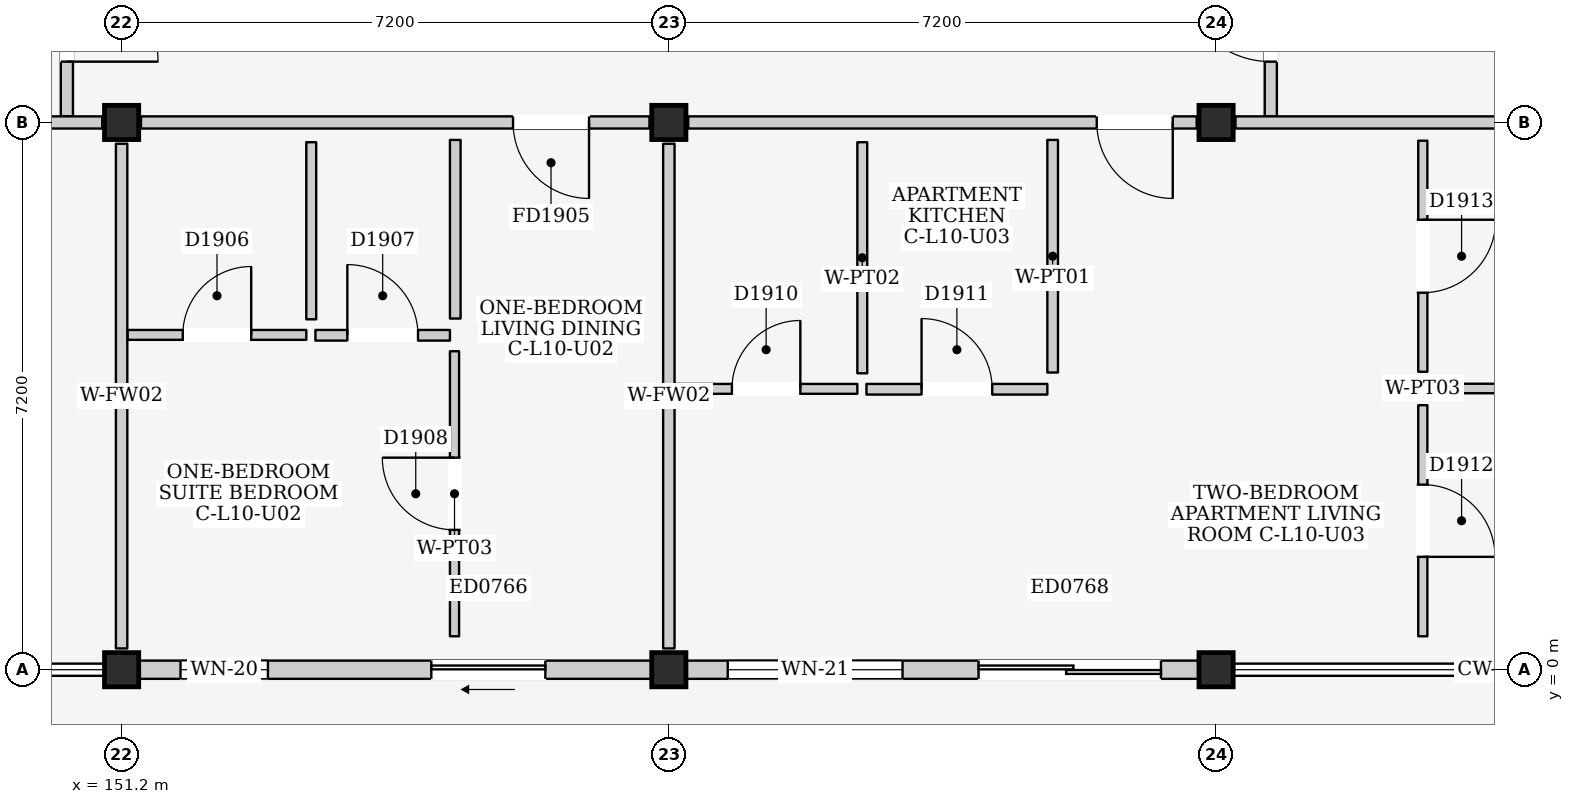
"""IFC4 building model, lengths in metres.
Left out: names, types, materials, properties, quantities, classifications, styles, units other than length and angle.
Written with IfcOpenShell. Run it as: python <this file> out.ifc"""

import sys

from ifc_helpers import new_model, si_unit, direction, frame, frame_2d, origin, origin_2d, place, context, subcontext, project, spatial, rectangle, extrude, element, fill, save


model = new_model("IFC4")
c1 = context("Model", 3, precision=1e-05, world=origin(), true_north=direction((0.0, 1.0)))
c2 = subcontext(c1, "Body", "Model", "MODEL_VIEW")
j1 = project(units=[si_unit("LENGTHUNIT", "METRE"), si_unit("PLANEANGLEUNIT", "RADIAN")], contexts=[c1])
p1 = place(None, origin())
s1 = spatial("IfcSite", under=j1, at=p1, CompositionType="ELEMENT")
p2 = place(p1, origin())
s2 = spatial("IfcBuilding", under=s1, at=p2, CompositionType="ELEMENT")
p3 = place(p2, frame((0.0, 0.0, 34.8)))
s3 = spatial("IfcBuildingStorey", under=s2, at=p3, CompositionType="ELEMENT", Elevation=34.8)
for number, where, z_axis, x_axis in (
    (1, (151.2, 0.0, 0.0), (0.0, 0.0, 1.0), (1.0, 0.0, 0.0)),
    (2, (151.2, 7.2, 0.0), (0.0, 0.0, 1.0), (1.0, 0.0, 0.0)),
    (3, (158.4, 0.0, 0.0), (0.0, 0.0, 1.0), (1.0, 0.0, 0.0)),
    (4, (158.4, 7.2, 0.0), (0.0, 0.0, 1.0), (1.0, 0.0, 0.0)),
    (5, (165.6, 0.0, 0.0), (0.0, 0.0, 1.0), (1.0, 0.0, 0.0)),
    (6, (165.6, 7.2, 0.0), (0.0, 0.0, 1.0), (1.0, 0.0, 0.0)),
):
    element("IfcColumn", number, at=place(p3, frame(where, z_axis=z_axis, x_axis=x_axis)), inside=s3, PredefinedType="COLUMN", context=c2, shape_type="SweptSolid", body=[
        extrude(rectangle(XDim=0.45, YDim=0.45, at=origin_2d()), origin(), (0.0, 0.0, 1.0), 3.2),
    ])
p4 = place(p3, frame((151.425, 0.0, 0.0), z_axis=(0.0, 0.0, 1.0), x_axis=(1.0, 0.0, 0.0)))
e7 = element("IfcWall", 7, at=p4, inside=s3, PredefinedType="ELEMENTEDWALL", context=c2, shape_type="SweptSolid", body=[
    extrude(rectangle(XDim=6.75, YDim=0.24, at=frame_2d((3.375, 0.0))), origin(), (0.0, 0.0, 1.0), 2.495),
])
p5 = place(p4, frame((3.85, 0.0, 0.0)))
e8 = element("IfcOpeningElement", 8, at=p5, cuts=e7, PredefinedType="OPENING", context=c2, shape_type="SweptSolid", body=[
    extrude(rectangle(XDim=1.5, YDim=2.12, at=frame_2d((0.75, 1.06))), frame((0.0, 0.135, 0.0), z_axis=(0.0, -1.0, 0.0), x_axis=(1.0, 0.0, 0.0)), (0.0, 0.0, 1.0), 0.27),
])
p6 = place(p4, frame((0.55, 0.0, 0.9)))
e9 = element("IfcOpeningElement", 9, at=p6, cuts=e7, PredefinedType="OPENING", context=c2, shape_type="SweptSolid", body=[
    extrude(rectangle(XDim=1.15, YDim=1.15, at=frame_2d((0.575, 0.575))), frame((0.0, 0.135, 0.0), z_axis=(0.0, -1.0, 0.0), x_axis=(1.0, 0.0, 0.0)), (0.0, 0.0, 1.0), 0.27),
])
p7 = place(p3, frame((158.625, 0.0, 0.0), z_axis=(0.0, 0.0, 1.0), x_axis=(1.0, 0.0, 0.0)))
e10 = element("IfcWall", 10, at=p7, inside=s3, PredefinedType="ELEMENTEDWALL", context=c2, shape_type="SweptSolid", body=[
    extrude(rectangle(XDim=6.75, YDim=0.24, at=frame_2d((3.375, 0.0))), origin(), (0.0, 0.0, 1.0), 2.495),
])
p8 = place(p7, frame((3.85, 0.0, 0.0)))
e11 = element("IfcOpeningElement", 11, at=p8, cuts=e10, PredefinedType="OPENING", context=c2, shape_type="SweptSolid", body=[
    extrude(rectangle(XDim=2.4, YDim=2.12, at=frame_2d((1.2, 1.06))), frame((0.0, 0.135, 0.0), z_axis=(0.0, -1.0, 0.0), x_axis=(1.0, 0.0, 0.0)), (0.0, 0.0, 1.0), 0.27),
])
p9 = place(p7, frame((0.55, 0.0, 0.785)))
e12 = element("IfcOpeningElement", 12, at=p9, cuts=e10, PredefinedType="OPENING", context=c2, shape_type="SweptSolid", body=[
    extrude(rectangle(XDim=2.3, YDim=1.6, at=frame_2d((1.15, 0.8))), frame((0.0, 0.135, 0.0), z_axis=(0.0, -1.0, 0.0), x_axis=(1.0, 0.0, 0.0)), (0.0, 0.0, 1.0), 0.27),
])
p10 = place(p3, frame((150.48, 7.28, 0.0), z_axis=(0.0, 0.0, 1.0), x_axis=(0.0, 1.0, 0.0)))
e13 = element("IfcWall", 13, at=p10, inside=s3, PredefinedType="PARTITIONING", context=c2, shape_type="SweptSolid", body=[
    extrude(rectangle(XDim=4.32, YDim=0.16, at=frame_2d((2.16, 0.0))), origin(), (0.0, 0.0, 1.0), 2.96),
])
p11 = place(p10, frame((0.72, 0.0, 0.0)))
e14 = element("IfcOpeningElement", 14, at=p11, cuts=e13, PredefinedType="OPENING", context=c2, shape_type="SweptSolid", body=[
    extrude(rectangle(XDim=1.2, YDim=2.2, at=frame_2d((0.6, 1.1))), frame((0.0, 0.095, 0.0), z_axis=(0.0, -1.0, 0.0), x_axis=(1.0, 0.0, 0.0)), (0.0, 0.0, 1.0), 0.19),
])
p12 = place(p3, frame((166.32, 7.28, 0.0), z_axis=(0.0, 0.0, 1.0), x_axis=(0.0, 1.0, 0.0)))
e15 = element("IfcWall", 15, at=p12, inside=s3, PredefinedType="PARTITIONING", context=c2, shape_type="SweptSolid", body=[
    extrude(rectangle(XDim=4.32, YDim=0.16, at=frame_2d((2.16, 0.0))), origin(), (0.0, 0.0, 1.0), 2.96),
])
p13 = place(p12, frame((0.72, 0.0, 0.0)))
e16 = element("IfcOpeningElement", 16, at=p13, cuts=e15, PredefinedType="OPENING", context=c2, shape_type="SweptSolid", body=[
    extrude(rectangle(XDim=1.2, YDim=2.2, at=frame_2d((0.6, 1.1))), frame((0.0, 0.095, 0.0), z_axis=(0.0, -1.0, 0.0), x_axis=(1.0, 0.0, 0.0)), (0.0, 0.0, 1.0), 0.19),
])
p14 = place(p3, frame((144.255, 7.2, 0.0), z_axis=(0.0, 0.0, 1.0), x_axis=(1.0, 0.0, 0.0)))
e17 = element("IfcWall", 17, at=p14, inside=s3, PredefinedType="PARTITIONING", context=c2, shape_type="SweptSolid", body=[
    extrude(rectangle(XDim=6.69, YDim=0.16, at=frame_2d((3.345, 0.0))), origin(), (0.0, 0.0, 1.0), 2.345),
])
p15 = place(p3, frame((151.2, 0.28, 0.0), z_axis=(0.0, 0.0, 1.0), x_axis=(0.0, 1.0, 0.0)))
e18 = element("IfcWall", 18, at=p15, inside=s3, PredefinedType="PARTITIONING", context=c2, shape_type="SweptSolid", body=[
    extrude(rectangle(XDim=6.64, YDim=0.15, at=frame_2d((3.32, 0.0))), origin(), (0.0, 0.0, 1.0), 2.445),
])
p16 = place(p3, frame((151.455, 7.2, 0.0), z_axis=(0.0, 0.0, 1.0), x_axis=(1.0, 0.0, 0.0)))
e19 = element("IfcWall", 19, at=p16, inside=s3, PredefinedType="PARTITIONING", context=c2, shape_type="SweptSolid", body=[
    extrude(rectangle(XDim=6.69, YDim=0.16, at=frame_2d((3.345, 0.0))), origin(), (0.0, 0.0, 1.0), 2.345),
])
p17 = place(p16, frame((4.895, 0.0, 0.0)))
e20 = element("IfcOpeningElement", 20, at=p17, cuts=e19, PredefinedType="OPENING", context=c2, shape_type="SweptSolid", body=[
    extrude(rectangle(XDim=1.0, YDim=2.15, at=frame_2d((0.5, 1.075))), frame((0.0, 0.095, 0.0), z_axis=(0.0, -1.0, 0.0), x_axis=(1.0, 0.0, 0.0)), (0.0, 0.0, 1.0), 0.19),
])
p18 = place(p3, frame((158.4, 0.28, 0.0), z_axis=(0.0, 0.0, 1.0), x_axis=(0.0, 1.0, 0.0)))
e21 = element("IfcWall", 21, at=p18, inside=s3, PredefinedType="PARTITIONING", context=c2, shape_type="SweptSolid", body=[
    extrude(rectangle(XDim=6.64, YDim=0.15, at=frame_2d((3.32, 0.0))), origin(), (0.0, 0.0, 1.0), 2.445),
])
p19 = place(p3, frame((151.28, 4.405, 0.0), z_axis=(0.0, 0.0, 1.0), x_axis=(1.0, 0.0, 0.0)))
e22 = element("IfcWall", 22, at=p19, inside=s3, PredefinedType="PARTITIONING", context=c2, shape_type="SweptSolid", body=[
    extrude(rectangle(XDim=2.35, YDim=0.13, at=frame_2d((1.175, 0.0))), origin(), (0.0, 0.0, 1.0), 2.96),
])
p20 = place(p19, frame((0.725, 0.0, 0.0)))
e23 = element("IfcOpeningElement", 23, at=p20, cuts=e22, PredefinedType="OPENING", context=c2, shape_type="SweptSolid", body=[
    extrude(rectangle(XDim=0.9, YDim=2.1, at=frame_2d((0.45, 1.05))), frame((0.0, 0.08, 0.0), z_axis=(0.0, -1.0, 0.0), x_axis=(1.0, 0.0, 0.0)), (0.0, 0.0, 1.0), 0.16),
])
p21 = place(p3, frame((153.695, 4.61, 0.0), z_axis=(0.0, 0.0, 1.0), x_axis=(0.0, 1.0, 0.0)))
e24 = element("IfcWall", 24, at=p21, inside=s3, PredefinedType="PARTITIONING", context=c2, shape_type="SweptSolid", body=[
    extrude(rectangle(XDim=2.33, YDim=0.13, at=frame_2d((1.165, 0.0))), origin(), (0.0, 0.0, 1.0), 2.96),
])
p22 = place(p3, frame((153.75, 4.4, 0.0), z_axis=(0.0, 0.0, 1.0), x_axis=(1.0, 0.0, 0.0)))
e25 = element("IfcWall", 25, at=p22, inside=s3, PredefinedType="PARTITIONING", context=c2, shape_type="SweptSolid", body=[
    extrude(rectangle(XDim=1.77, YDim=0.14, at=frame_2d((0.885, 0.0))), origin(), (0.0, 0.0, 1.0), 2.96),
])
p23 = place(p22, frame((0.42, 0.0, 0.0)))
e26 = element("IfcOpeningElement", 26, at=p23, cuts=e25, PredefinedType="OPENING", context=c2, shape_type="SweptSolid", body=[
    extrude(rectangle(XDim=0.93, YDim=2.14, at=frame_2d((0.465, 1.07))), frame((0.0, 0.085, 0.0), z_axis=(0.0, -1.0, 0.0), x_axis=(1.0, 0.0, 0.0)), (0.0, 0.0, 1.0), 0.17),
])
p24 = place(p3, frame((155.59, 4.62, 0.0), z_axis=(0.0, 0.0, 1.0), x_axis=(0.0, 1.0, 0.0)))
e27 = element("IfcWall", 27, at=p24, inside=s3, PredefinedType="PARTITIONING", context=c2, shape_type="SweptSolid", body=[
    extrude(rectangle(XDim=2.35, YDim=0.14, at=frame_2d((1.175, 0.0))), origin(), (0.0, 0.0, 1.0), 2.96),
])
p25 = place(p3, frame((155.58, 0.44, 0.0), z_axis=(0.0, 0.0, 1.0), x_axis=(0.0, 1.0, 0.0)))
e28 = element("IfcWall", 28, at=p25, inside=s3, PredefinedType="PARTITIONING", context=c2, shape_type="SweptSolid", body=[
    extrude(rectangle(XDim=3.75, YDim=0.12, at=frame_2d((1.875, 0.0))), origin(), (0.0, 0.0, 1.0), 2.96),
])
p26 = place(p25, frame((1.4, 0.0, 0.0)))
e29 = element("IfcOpeningElement", 29, at=p26, cuts=e28, PredefinedType="OPENING", context=c2, shape_type="SweptSolid", body=[
    extrude(rectangle(XDim=0.95, YDim=2.15, at=frame_2d((0.475, 1.075))), frame((0.0, 0.075, 0.0), z_axis=(0.0, -1.0, 0.0), x_axis=(1.0, 0.0, 0.0)), (0.0, 0.0, 1.0), 0.15),
])
p27 = place(p3, frame((158.655, 7.2, 0.0), z_axis=(0.0, 0.0, 1.0), x_axis=(1.0, 0.0, 0.0)))
e30 = element("IfcWall", 30, at=p27, inside=s3, PredefinedType="PARTITIONING", context=c2, shape_type="SweptSolid", body=[
    extrude(rectangle(XDim=6.69, YDim=0.16, at=frame_2d((3.345, 0.0))), origin(), (0.0, 0.0, 1.0), 2.345),
])
p28 = place(p27, frame((5.375, 0.0, 0.0)))
e31 = element("IfcOpeningElement", 31, at=p28, cuts=e30, PredefinedType="OPENING", context=c2, shape_type="SweptSolid", body=[
    extrude(rectangle(XDim=1.0, YDim=2.15, at=frame_2d((0.5, 1.075))), frame((0.0, 0.095, 0.0), z_axis=(0.0, -1.0, 0.0), x_axis=(1.0, 0.0, 0.0)), (0.0, 0.0, 1.0), 0.19),
])
p29 = place(p3, frame((165.855, 7.2, 0.0), z_axis=(0.0, 0.0, 1.0), x_axis=(1.0, 0.0, 0.0)))
e32 = element("IfcWall", 32, at=p29, inside=s3, PredefinedType="PARTITIONING", context=c2, shape_type="SweptSolid", body=[
    extrude(rectangle(XDim=6.69, YDim=0.16, at=frame_2d((3.345, 0.0))), origin(), (0.0, 0.0, 1.0), 2.345),
])
p30 = place(p3, frame((158.48, 3.695, 0.0), z_axis=(0.0, 0.0, 1.0), x_axis=(1.0, 0.0, 0.0)))
e33 = element("IfcWall", 33, at=p30, inside=s3, PredefinedType="PARTITIONING", context=c2, shape_type="SweptSolid", body=[
    extrude(rectangle(XDim=2.4, YDim=0.13, at=frame_2d((1.2, 0.0))), origin(), (0.0, 0.0, 1.0), 2.96),
])
p31 = place(p30, frame((0.75, 0.0, 0.0)))
e34 = element("IfcOpeningElement", 34, at=p31, cuts=e33, PredefinedType="OPENING", context=c2, shape_type="SweptSolid", body=[
    extrude(rectangle(XDim=0.9, YDim=2.1, at=frame_2d((0.45, 1.05))), frame((0.0, 0.08, 0.0), z_axis=(0.0, -1.0, 0.0), x_axis=(1.0, 0.0, 0.0)), (0.0, 0.0, 1.0), 0.16),
])
p32 = place(p3, frame((160.945, 3.9, 0.0), z_axis=(0.0, 0.0, 1.0), x_axis=(0.0, 1.0, 0.0)))
e35 = element("IfcWall", 35, at=p32, inside=s3, PredefinedType="PARTITIONING", context=c2, shape_type="SweptSolid", body=[
    extrude(rectangle(XDim=3.04, YDim=0.13, at=frame_2d((1.52, 0.0))), origin(), (0.0, 0.0, 1.0), 2.96),
])
p33 = place(p3, frame((161.0, 3.69, 0.0), z_axis=(0.0, 0.0, 1.0), x_axis=(1.0, 0.0, 0.0)))
e36 = element("IfcWall", 36, at=p33, inside=s3, PredefinedType="PARTITIONING", context=c2, shape_type="SweptSolid", body=[
    extrude(rectangle(XDim=2.38, YDim=0.14, at=frame_2d((1.19, 0.0))), origin(), (0.0, 0.0, 1.0), 2.96),
])
p34 = place(p33, frame((0.725, 0.0, 0.0)))
e37 = element("IfcOpeningElement", 37, at=p34, cuts=e36, PredefinedType="OPENING", context=c2, shape_type="SweptSolid", body=[
    extrude(rectangle(XDim=0.93, YDim=2.14, at=frame_2d((0.465, 1.07))), frame((0.0, 0.085, 0.0), z_axis=(0.0, -1.0, 0.0), x_axis=(1.0, 0.0, 0.0)), (0.0, 0.0, 1.0), 0.17),
])
p35 = place(p3, frame((163.45, 3.91, 0.0), z_axis=(0.0, 0.0, 1.0), x_axis=(0.0, 1.0, 0.0)))
e38 = element("IfcWall", 38, at=p35, inside=s3, PredefinedType="PARTITIONING", context=c2, shape_type="SweptSolid", body=[
    extrude(rectangle(XDim=3.06, YDim=0.14, at=frame_2d((1.53, 0.0))), origin(), (0.0, 0.0, 1.0), 2.96),
])
p36 = place(p3, frame((168.32, 0.44, 0.0), z_axis=(0.0, 0.0, 1.0), x_axis=(0.0, 1.0, 0.0)))
e39 = element("IfcWall", 39, at=p36, inside=s3, PredefinedType="PARTITIONING", context=c2, shape_type="SweptSolid", body=[
    extrude(rectangle(XDim=3.04, YDim=0.12, at=frame_2d((1.52, 0.0))), origin(), (0.0, 0.0, 1.0), 2.96),
])
p37 = place(p36, frame((1.045, 0.0, 0.0)))
e40 = element("IfcOpeningElement", 40, at=p37, cuts=e39, PredefinedType="OPENING", context=c2, shape_type="SweptSolid", body=[
    extrude(rectangle(XDim=0.95, YDim=2.15, at=frame_2d((0.475, 1.075))), frame((0.0, 0.075, 0.0), z_axis=(0.0, -1.0, 0.0), x_axis=(1.0, 0.0, 0.0)), (0.0, 0.0, 1.0), 0.15),
])
p38 = place(p3, frame((168.52, 3.7, 0.0), z_axis=(0.0, 0.0, 1.0), x_axis=(1.0, 0.0, 0.0)))
e41 = element("IfcWall", 41, at=p38, inside=s3, PredefinedType="PARTITIONING", context=c2, shape_type="SweptSolid", body=[
    extrude(rectangle(XDim=4.06, YDim=0.125, at=frame_2d((2.03, 0.0))), origin(), (0.0, 0.0, 1.0), 2.96),
])
p39 = place(p3, frame((168.32, 3.92, 0.0), z_axis=(0.0, 0.0, 1.0), x_axis=(0.0, 1.0, 0.0)))
e42 = element("IfcWall", 42, at=p39, inside=s3, PredefinedType="PARTITIONING", context=c2, shape_type="SweptSolid", body=[
    extrude(rectangle(XDim=3.04, YDim=0.12, at=frame_2d((1.52, 0.0))), origin(), (0.0, 0.0, 1.0), 2.96),
])
p40 = place(p39, frame((1.04, 0.0, 0.0)))
e43 = element("IfcOpeningElement", 43, at=p40, cuts=e42, PredefinedType="OPENING", context=c2, shape_type="SweptSolid", body=[
    extrude(rectangle(XDim=0.96, YDim=2.15, at=frame_2d((0.48, 1.075))), frame((0.0, 0.075, 0.0), z_axis=(0.0, -1.0, 0.0), x_axis=(1.0, 0.0, 0.0)), (0.0, 0.0, 1.0), 0.15),
])
p41 = place(p5, frame((1.5, 0.0, 0.0), z_axis=(0.0, 0.0, 1.0), x_axis=(-1.0, 0.0, 0.0)))
e44 = element("IfcDoor", 44, at=p41, inside=s3, OperationType="SLIDING_TO_LEFT", PredefinedType="DOOR", context=c2, shape_type="SweptSolid", body=[
    extrude(rectangle(XDim=1.5, YDim=2.12, at=frame_2d((0.75, 1.06))), frame((0.0, 0.025, 0.0), z_axis=(0.0, -1.0, 0.0), x_axis=(1.0, 0.0, 0.0)), (0.0, 0.0, 1.0), 0.05),
])
fill(e8, e44)
p42 = place(p6, origin())
e45 = element("IfcWindow", 45, at=p42, inside=s3, PartitioningType="SINGLE_PANEL", PredefinedType="WINDOW", context=c2, shape_type="SweptSolid", body=[
    extrude(rectangle(XDim=1.15, YDim=1.15, at=frame_2d((0.575, 0.575))), frame((0.0, 0.03, 0.0), z_axis=(0.0, -1.0, 0.0), x_axis=(1.0, 0.0, 0.0)), (0.0, 0.0, 1.0), 0.06),
])
fill(e9, e45)
p43 = place(p8, frame((2.4, 0.0, 0.0), z_axis=(0.0, 0.0, 1.0), x_axis=(-1.0, 0.0, 0.0)))
e46 = element("IfcDoor", 46, at=p43, inside=s3, OperationType="DOUBLE_DOOR_SLIDING", PredefinedType="DOOR", context=c2, shape_type="SweptSolid", body=[
    extrude(rectangle(XDim=2.4, YDim=2.12, at=frame_2d((1.2, 1.06))), frame((0.0, 0.025, 0.0), z_axis=(0.0, -1.0, 0.0), x_axis=(1.0, 0.0, 0.0)), (0.0, 0.0, 1.0), 0.05),
])
fill(e11, e46)
p44 = place(p9, origin())
e47 = element("IfcWindow", 47, at=p44, inside=s3, PartitioningType="TRIPLE_PANEL_VERTICAL", PredefinedType="WINDOW", context=c2, shape_type="SweptSolid", body=[
    extrude(rectangle(XDim=2.3, YDim=1.6, at=frame_2d((1.15, 0.8))), frame((0.0, 0.03, 0.0), z_axis=(0.0, -1.0, 0.0), x_axis=(1.0, 0.0, 0.0)), (0.0, 0.0, 1.0), 0.06),
])
fill(e12, e47)
p45 = place(p11, frame((1.2, 0.0, 0.0), z_axis=(0.0, 0.0, 1.0), x_axis=(-1.0, 0.0, 0.0)))
e48 = element("IfcDoor", 48, at=p45, inside=s3, OperationType="SINGLE_SWING_RIGHT", PredefinedType="DOOR", context=c2, shape_type="SweptSolid", body=[
    extrude(rectangle(XDim=1.2, YDim=2.2, at=frame_2d((0.6, 1.1))), frame((0.0, 0.025, 0.0), z_axis=(0.0, -1.0, 0.0), x_axis=(1.0, 0.0, 0.0)), (0.0, 0.0, 1.0), 0.05),
])
fill(e14, e48)
p46 = place(p13, origin())
e49 = element("IfcDoor", 49, at=p46, inside=s3, OperationType="SINGLE_SWING_RIGHT", PredefinedType="DOOR", context=c2, shape_type="SweptSolid", body=[
    extrude(rectangle(XDim=1.2, YDim=2.2, at=frame_2d((0.6, 1.1))), frame((0.0, 0.025, 0.0), z_axis=(0.0, -1.0, 0.0), x_axis=(1.0, 0.0, 0.0)), (0.0, 0.0, 1.0), 0.05),
])
fill(e16, e49)
p47 = place(p17, frame((1.0, 0.0, 0.0), z_axis=(0.0, 0.0, 1.0), x_axis=(-1.0, 0.0, 0.0)))
e50 = element("IfcDoor", 50, at=p47, inside=s3, OperationType="SINGLE_SWING_LEFT", PredefinedType="DOOR", context=c2, shape_type="SweptSolid", body=[
    extrude(rectangle(XDim=1.0, YDim=2.15, at=frame_2d((0.5, 1.075))), frame((0.0, 0.025, 0.0), z_axis=(0.0, -1.0, 0.0), x_axis=(1.0, 0.0, 0.0)), (0.0, 0.0, 1.0), 0.05),
])
fill(e20, e50)
p48 = place(p20, origin())
e51 = element("IfcDoor", 51, at=p48, inside=s3, OperationType="SINGLE_SWING_RIGHT", PredefinedType="DOOR", context=c2, shape_type="SweptSolid", body=[
    extrude(rectangle(XDim=0.9, YDim=2.1, at=frame_2d((0.45, 1.05))), frame((0.0, 0.025, 0.0), z_axis=(0.0, -1.0, 0.0), x_axis=(1.0, 0.0, 0.0)), (0.0, 0.0, 1.0), 0.05),
])
fill(e23, e51)
p49 = place(p23, origin())
e52 = element("IfcDoor", 52, at=p49, inside=s3, OperationType="SINGLE_SWING_LEFT", PredefinedType="DOOR", context=c2, shape_type="SweptSolid", body=[
    extrude(rectangle(XDim=0.93, YDim=2.14, at=frame_2d((0.465, 1.07))), frame((0.0, 0.025, 0.0), z_axis=(0.0, -1.0, 0.0), x_axis=(1.0, 0.0, 0.0)), (0.0, 0.0, 1.0), 0.05),
])
fill(e26, e52)
p50 = place(p26, origin())
e53 = element("IfcDoor", 53, at=p50, inside=s3, OperationType="SINGLE_SWING_RIGHT", PredefinedType="DOOR", context=c2, shape_type="SweptSolid", body=[
    extrude(rectangle(XDim=0.95, YDim=2.15, at=frame_2d((0.475, 1.075))), frame((0.0, 0.025, 0.0), z_axis=(0.0, -1.0, 0.0), x_axis=(1.0, 0.0, 0.0)), (0.0, 0.0, 1.0), 0.05),
])
fill(e29, e53)
p51 = place(p28, frame((1.0, 0.0, 0.0), z_axis=(0.0, 0.0, 1.0), x_axis=(-1.0, 0.0, 0.0)))
e54 = element("IfcDoor", 54, at=p51, inside=s3, OperationType="SINGLE_SWING_LEFT", PredefinedType="DOOR", context=c2, shape_type="SweptSolid", body=[
    extrude(rectangle(XDim=1.0, YDim=2.15, at=frame_2d((0.5, 1.075))), frame((0.0, 0.025, 0.0), z_axis=(0.0, -1.0, 0.0), x_axis=(1.0, 0.0, 0.0)), (0.0, 0.0, 1.0), 0.05),
])
fill(e31, e54)
p52 = place(p31, origin())
e55 = element("IfcDoor", 55, at=p52, inside=s3, OperationType="SINGLE_SWING_RIGHT", PredefinedType="DOOR", context=c2, shape_type="SweptSolid", body=[
    extrude(rectangle(XDim=0.9, YDim=2.1, at=frame_2d((0.45, 1.05))), frame((0.0, 0.025, 0.0), z_axis=(0.0, -1.0, 0.0), x_axis=(1.0, 0.0, 0.0)), (0.0, 0.0, 1.0), 0.05),
])
fill(e34, e55)
p53 = place(p34, origin())
e56 = element("IfcDoor", 56, at=p53, inside=s3, OperationType="SINGLE_SWING_LEFT", PredefinedType="DOOR", context=c2, shape_type="SweptSolid", body=[
    extrude(rectangle(XDim=0.93, YDim=2.14, at=frame_2d((0.465, 1.07))), frame((0.0, 0.025, 0.0), z_axis=(0.0, -1.0, 0.0), x_axis=(1.0, 0.0, 0.0)), (0.0, 0.0, 1.0), 0.05),
])
fill(e37, e56)
p54 = place(p37, frame((0.95, 0.0, 0.0), z_axis=(0.0, 0.0, 1.0), x_axis=(-1.0, 0.0, 0.0)))
e57 = element("IfcDoor", 57, at=p54, inside=s3, OperationType="SINGLE_SWING_RIGHT", PredefinedType="DOOR", context=c2, shape_type="SweptSolid", body=[
    extrude(rectangle(XDim=0.95, YDim=2.15, at=frame_2d((0.475, 1.075))), frame((0.0, 0.025, 0.0), z_axis=(0.0, -1.0, 0.0), x_axis=(1.0, 0.0, 0.0)), (0.0, 0.0, 1.0), 0.05),
])
fill(e40, e57)
p55 = place(p40, frame((0.96, 0.0, 0.0), z_axis=(0.0, 0.0, 1.0), x_axis=(-1.0, 0.0, 0.0)))
e58 = element("IfcDoor", 58, at=p55, inside=s3, OperationType="SINGLE_SWING_LEFT", PredefinedType="DOOR", context=c2, shape_type="SweptSolid", body=[
    extrude(rectangle(XDim=0.96, YDim=2.15, at=frame_2d((0.48, 1.075))), frame((0.0, 0.025, 0.0), z_axis=(0.0, -1.0, 0.0), x_axis=(1.0, 0.0, 0.0)), (0.0, 0.0, 1.0), 0.05),
])
fill(e43, e58)
save(model, sys.argv[1])
